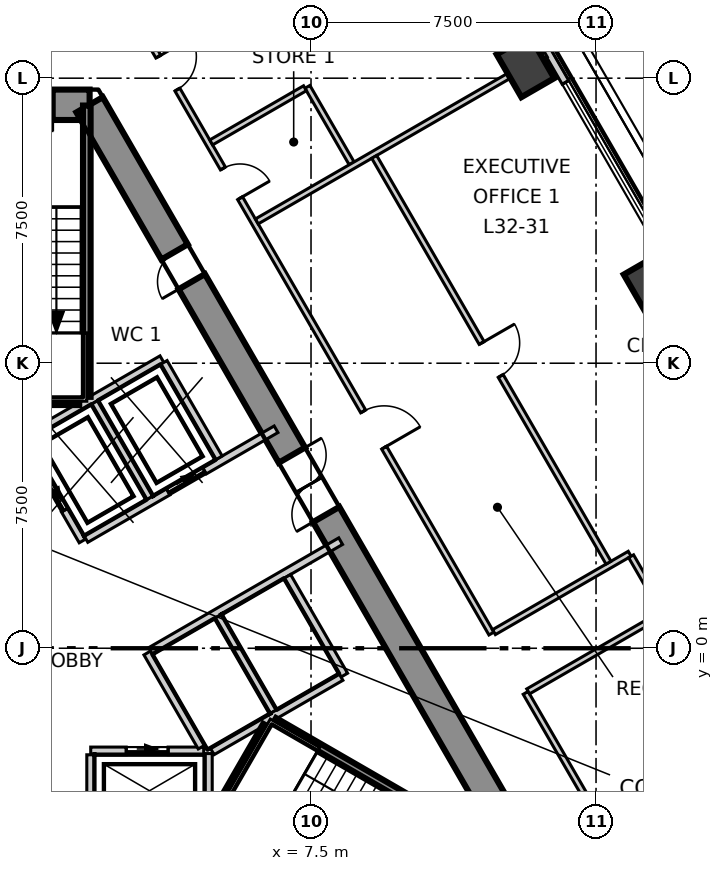
"""IFC4 building model, lengths in metres.
Left out: names, types, materials, properties, quantities, classifications, styles, units other than length and angle.
Written with IfcOpenShell. Run it as: python <this file> out.ifc"""

import sys

from ifc_helpers import new_model, si_unit, direction, frame, frame_2d, origin, origin_2d, place, context, subcontext, project, spatial, polyline, rectangle, outline, extrude, element, fill, save


model = new_model("IFC4")
c1 = context("Model", 3, precision=1e-05, world=origin(), true_north=direction((0.0, 1.0)))
c2 = subcontext(c1, "Body", "Model", "MODEL_VIEW")
j1 = project(units=[si_unit("LENGTHUNIT", "METRE"), si_unit("PLANEANGLEUNIT", "RADIAN")], contexts=[c1])
p1 = place(None, origin())
s1 = spatial("IfcSite", under=j1, at=p1, CompositionType="ELEMENT")
p2 = place(p1, origin())
s2 = spatial("IfcBuilding", under=s1, at=p2, CompositionType="ELEMENT")
p3 = place(p2, frame((0.0, 0.0, 140.3)))
s3 = spatial("IfcBuildingStorey", under=s2, at=p3, CompositionType="ELEMENT", Elevation=140.3)
p4 = place(p3, frame((1.674, 14.3, -0.3), z_axis=(0.0, 0.0, 1.0), x_axis=(-1.0, 0.0, 0.0)))
e1 = element("IfcWall", 1, at=p4, inside=s3, PredefinedType="SHEAR", context=c2, shape_type="SweptSolid", body=[
    extrude(outline(polyline([(-0.231, -0.4), (1.674, -0.4), (3.579, -0.4), (3.117, 0.4), (1.674, 0.4), (0.231, 0.4), (-0.231, -0.4)])), origin(), (0.0, 0.0, 1.0), 4.0),
])
p5 = place(p4, frame((0.974, 0.0, 0.3)))
e2 = element("IfcOpeningElement", 2, at=p5, cuts=e1, PredefinedType="OPENING", context=c2, shape_type="SweptSolid", body=[
    extrude(rectangle(XDim=1.4, YDim=2.1, at=frame_2d((0.7, 1.05))), frame((0.0, 0.41, 0.0), z_axis=(0.0, -1.0, 0.0), x_axis=(1.0, 0.0, 0.0)), (0.0, 0.0, 1.0), 0.82),
])
p6 = place(p3, frame((13.221, -5.7, -0.3), z_axis=(0.0, 0.0, 1.0), x_axis=(-0.499995765644, 0.866027848477, 0.0)))
e3 = element("IfcWall", 3, at=p6, inside=s3, PredefinedType="SHEAR", context=c2, shape_type="SweptSolid", body=[
    extrude(outline(polyline([(-0.231, -0.4), (1.732, -0.4), (3.695, -0.4), (5.658, -0.4), (7.621, -0.4), (9.584, -0.4), (11.547, -0.4), (13.51, -0.4), (15.473, -0.4), (17.436, -0.4), (19.399, -0.4), (21.362, -0.4), (23.325, -0.4), (22.863, 0.4), (20.977, 0.4), (19.091, 0.4), (17.205, 0.4), (15.319, 0.4), (13.433, 0.4), (11.547, 0.4), (9.661, 0.4), (7.775, 0.4), (5.889, 0.4), (4.003, 0.4), (2.117, 0.4), (0.231, 0.4), (-0.231, -0.4)])), origin(), (0.0, 0.0, 1.0), 4.0),
])
p7 = place(p6, frame((10.647, 0.0, 0.3)))
e4 = element("IfcOpeningElement", 4, at=p7, cuts=e3, PredefinedType="OPENING", context=c2, shape_type="SweptSolid", body=[
    extrude(rectangle(XDim=1.8, YDim=2.1, at=frame_2d((0.9, 1.05))), frame((0.0, 0.41, 0.0), z_axis=(0.0, -1.0, 0.0), x_axis=(1.0, 0.0, 0.0)), (0.0, 0.0, 1.0), 0.82),
])
p8 = place(p6, frame((17.721, 0.0, 0.3)))
e5 = element("IfcOpeningElement", 5, at=p8, cuts=e3, PredefinedType="OPENING", context=c2, shape_type="SweptSolid", body=[
    extrude(rectangle(XDim=0.9, YDim=2.1, at=frame_2d((0.45, 1.05))), frame((0.0, 0.41, 0.0), z_axis=(0.0, -1.0, 0.0), x_axis=(1.0, 0.0, 0.0)), (0.0, 0.0, 1.0), 0.82),
])
for number, where, z_axis, x_axis in (
    (6, (16.488, 9.52, -0.3), (0.0, 0.0, 1.0), (-0.5, 0.866, 0.0)),
    (7, (13.143, 15.313, -0.3), (0.0, 0.0, 1.0), (-0.5, 0.866, 0.0)),
):
    element("IfcColumn", number, at=place(p3, frame(where, z_axis=z_axis, x_axis=x_axis)), inside=s3, PredefinedType="COLUMN", context=c2, shape_type="SweptSolid", body=[
        extrude(rectangle(XDim=1.3, YDim=1.0, at=origin_2d()), origin(), (0.0, 0.0, 1.0), 4.0),
    ])
p9 = place(p3, frame((31.126, -14.433, 0.0), z_axis=(0.0, 0.0, 1.0), x_axis=(-0.500008098571, 0.866020728022, 0.0)))
e8 = element("IfcWall", 8, at=p9, inside=s3, PredefinedType="ELEMENTEDWALL", context=c2, shape_type="SweptSolid", body=[
    extrude(rectangle(XDim=56.105, YDim=0.2, at=frame_2d((28.052, 0.0))), origin(), (0.0, 0.0, 1.0), 3.7),
])
p10 = place(p9, frame((2.198, 0.0, 0.9)))
e9 = element("IfcOpeningElement", 9, at=p10, cuts=e8, PredefinedType="OPENING", context=c2, shape_type="SweptSolid", body=[
    extrude(rectangle(XDim=4.9, YDim=2.5, at=frame_2d((2.45, 1.25))), frame((0.0, 0.11, 0.0), z_axis=(0.0, -1.0, 0.0), x_axis=(1.0, 0.0, 0.0)), (0.0, 0.0, 1.0), 0.22),
])
p11 = place(p9, frame((8.888, 0.0, 0.9)))
e10 = element("IfcOpeningElement", 10, at=p11, cuts=e8, PredefinedType="OPENING", context=c2, shape_type="SweptSolid", body=[
    extrude(rectangle(XDim=4.9, YDim=2.5, at=frame_2d((2.45, 1.25))), frame((0.0, 0.11, 0.0), z_axis=(0.0, -1.0, 0.0), x_axis=(1.0, 0.0, 0.0)), (0.0, 0.0, 1.0), 0.22),
])
p12 = place(p9, frame((15.578, 0.0, 0.9)))
e11 = element("IfcOpeningElement", 11, at=p12, cuts=e8, PredefinedType="OPENING", context=c2, shape_type="SweptSolid", body=[
    extrude(rectangle(XDim=4.9, YDim=2.5, at=frame_2d((2.45, 1.25))), frame((0.0, 0.11, 0.0), z_axis=(0.0, -1.0, 0.0), x_axis=(1.0, 0.0, 0.0)), (0.0, 0.0, 1.0), 0.22),
])
p13 = place(p9, frame((22.267, 0.0, 0.9)))
e12 = element("IfcOpeningElement", 12, at=p13, cuts=e8, PredefinedType="OPENING", context=c2, shape_type="SweptSolid", body=[
    extrude(rectangle(XDim=4.9, YDim=2.5, at=frame_2d((2.45, 1.25))), frame((0.0, 0.11, 0.0), z_axis=(0.0, -1.0, 0.0), x_axis=(1.0, 0.0, 0.0)), (0.0, 0.0, 1.0), 0.22),
])
p14 = place(p9, frame((28.957, 0.0, 0.9)))
e13 = element("IfcOpeningElement", 13, at=p14, cuts=e8, PredefinedType="OPENING", context=c2, shape_type="SweptSolid", body=[
    extrude(rectangle(XDim=4.9, YDim=2.5, at=frame_2d((2.45, 1.25))), frame((0.0, 0.11, 0.0), z_axis=(0.0, -1.0, 0.0), x_axis=(1.0, 0.0, 0.0)), (0.0, 0.0, 1.0), 0.22),
])
p15 = place(p9, frame((35.647, 0.0, 0.9)))
e14 = element("IfcOpeningElement", 14, at=p15, cuts=e8, PredefinedType="OPENING", context=c2, shape_type="SweptSolid", body=[
    extrude(rectangle(XDim=4.9, YDim=2.5, at=frame_2d((2.45, 1.25))), frame((0.0, 0.11, 0.0), z_axis=(0.0, -1.0, 0.0), x_axis=(1.0, 0.0, 0.0)), (0.0, 0.0, 1.0), 0.22),
])
p16 = place(p9, frame((42.337, 0.0, 0.9)))
e15 = element("IfcOpeningElement", 15, at=p16, cuts=e8, PredefinedType="OPENING", context=c2, shape_type="SweptSolid", body=[
    extrude(rectangle(XDim=4.9, YDim=2.5, at=frame_2d((2.45, 1.25))), frame((0.0, 0.11, 0.0), z_axis=(0.0, -1.0, 0.0), x_axis=(1.0, 0.0, 0.0)), (0.0, 0.0, 1.0), 0.22),
])
p17 = place(p9, frame((49.027, 0.0, 0.9)))
e16 = element("IfcOpeningElement", 16, at=p17, cuts=e8, PredefinedType="OPENING", context=c2, shape_type="SweptSolid", body=[
    extrude(rectangle(XDim=4.9, YDim=2.5, at=frame_2d((2.45, 1.25))), frame((0.0, 0.11, 0.0), z_axis=(0.0, -1.0, 0.0), x_axis=(1.0, 0.0, 0.0)), (0.0, 0.0, 1.0), 0.22),
])
p18 = place(p3, frame((0.076, 21.468, 0.0), z_axis=(0.0, 0.0, 1.0), x_axis=(0.499999691263, -0.866025582034, 0.0)))
e17 = element("IfcWall", 17, at=p18, inside=s3, PredefinedType="PARTITIONING", context=c2, shape_type="SweptSolid", body=[
    extrude(rectangle(XDim=24.342, YDim=0.15, at=frame_2d((12.171, 0.0))), origin(), (0.0, 0.0, 1.0), 3.7),
])
p19 = place(p18, frame((17.594, 0.0, 0.0)))
e18 = element("IfcOpeningElement", 18, at=p19, cuts=e17, PredefinedType="OPENING", context=c2, shape_type="SweptSolid", body=[
    extrude(rectangle(XDim=1.1, YDim=2.1, at=frame_2d((0.55, 1.05))), frame((0.0, 0.085, 0.0), z_axis=(0.0, -1.0, 0.0), x_axis=(1.0, 0.0, 0.0)), (0.0, 0.0, 1.0), 0.17),
])
p20 = place(p18, frame((6.814, 0.0, 0.0)))
e19 = element("IfcOpeningElement", 19, at=p20, cuts=e17, PredefinedType="OPENING", context=c2, shape_type="SweptSolid", body=[
    extrude(rectangle(XDim=1.0, YDim=2.1, at=frame_2d((0.5, 1.05))), frame((0.0, 0.085, 0.0), z_axis=(0.0, -1.0, 0.0), x_axis=(1.0, 0.0, 0.0)), (0.0, 0.0, 1.0), 0.17),
])
p21 = place(p18, frame((10.214, 0.0, 0.0)))
e20 = element("IfcOpeningElement", 20, at=p21, cuts=e17, PredefinedType="OPENING", context=c2, shape_type="SweptSolid", body=[
    extrude(rectangle(XDim=0.9, YDim=2.1, at=frame_2d((0.45, 1.05))), frame((0.0, 0.085, 0.0), z_axis=(0.0, -1.0, 0.0), x_axis=(1.0, 0.0, 0.0)), (0.0, 0.0, 1.0), 0.17),
])
p22 = place(p18, frame((1.924, 0.0, 0.0)))
e21 = element("IfcOpeningElement", 21, at=p22, cuts=e17, PredefinedType="OPENING", context=c2, shape_type="SweptSolid", body=[
    extrude(rectangle(XDim=1.1, YDim=2.1, at=frame_2d((0.55, 1.05))), frame((0.0, 0.085, 0.0), z_axis=(0.0, -1.0, 0.0), x_axis=(1.0, 0.0, 0.0)), (0.0, 0.0, 1.0), 0.17),
])
p23 = place(p3, frame((13.148, -1.174, 0.0), z_axis=(0.0, 0.0, 1.0), x_axis=(0.500088017957, -0.865974580629, 0.0)))
e22 = element("IfcWall", 22, at=p23, inside=s3, PredefinedType="PARTITIONING", context=c2, shape_type="SweptSolid", body=[
    extrude(rectangle(XDim=10.964, YDim=0.15, at=frame_2d((5.482, 0.0))), origin(), (0.0, 0.0, 1.0), 3.7),
])
p24 = place(p23, frame((4.964, 0.0, 0.0)))
e23 = element("IfcOpeningElement", 23, at=p24, cuts=e22, PredefinedType="OPENING", context=c2, shape_type="SweptSolid", body=[
    extrude(rectangle(XDim=1.1, YDim=2.1, at=frame_2d((0.55, 1.05))), frame((0.0, 0.085, 0.0), z_axis=(0.0, -1.0, 0.0), x_axis=(1.0, 0.0, 0.0)), (0.0, 0.0, 1.0), 0.17),
])
p25 = place(p3, frame((7.406, 14.772, 0.0), z_axis=(0.0, 0.0, 1.0), x_axis=(0.50029509392, -0.865854964183, 0.0)))
e24 = element("IfcWall", 24, at=p25, inside=s3, PredefinedType="PARTITIONING", context=c2, shape_type="SweptSolid", body=[
    extrude(rectangle(XDim=2.325, YDim=0.15, at=frame_2d((1.162, 0.0))), origin(), (0.0, 0.0, 1.0), 3.7),
])
p26 = place(p3, frame((4.873, 13.31, 0.0), z_axis=(0.0, 0.0, 1.0), x_axis=(0.866004402611, 0.500036373335, 0.0)))
e25 = element("IfcWall", 25, at=p26, inside=s3, PredefinedType="PARTITIONING", context=c2, shape_type="SweptSolid", body=[
    extrude(rectangle(XDim=2.85, YDim=0.15, at=frame_2d((1.425, 0.0))), origin(), (0.0, 0.0, 1.0), 3.7),
])
p27 = place(p3, frame((6.073, 11.231, 0.0), z_axis=(0.0, 0.0, 1.0), x_axis=(0.866014327354, 0.50001918445, 0.0)))
e26 = element("IfcWall", 26, at=p27, inside=s3, PredefinedType="PARTITIONING", context=c2, shape_type="SweptSolid", body=[
    extrude(rectangle(XDim=8.784, YDim=0.15, at=frame_2d((4.392, 0.0))), origin(), (0.0, 0.0, 1.0), 3.7),
])
p28 = place(p3, frame((12.314, 0.424, 0.0), z_axis=(0.0, 0.0, 1.0), x_axis=(0.865997263264, 0.500048737644, 0.0)))
e27 = element("IfcWall", 27, at=p28, inside=s3, PredefinedType="PARTITIONING", context=c2, shape_type="SweptSolid", body=[
    extrude(rectangle(XDim=4.124, YDim=0.15, at=frame_2d((2.062, 0.0))), origin(), (0.0, 0.0, 1.0), 3.7),
])
p29 = place(p3, frame((15.923, 2.421, 0.0), z_axis=(0.0, 0.0, 1.0), x_axis=(0.499702028684, -0.866197369269, 0.0)))
e28 = element("IfcWall", 28, at=p29, inside=s3, PredefinedType="PARTITIONING", context=c2, shape_type="SweptSolid", body=[
    extrude(rectangle(XDim=1.725, YDim=0.15, at=frame_2d((0.862, 0.0))), origin(), (0.0, 0.0, 1.0), 3.7),
])
p30 = place(p3, frame((13.214, -1.135, 0.0), z_axis=(0.0, 0.0, 1.0), x_axis=(0.865940524948, 0.500146985649, 0.0)))
e29 = element("IfcWall", 29, at=p30, inside=s3, PredefinedType="PARTITIONING", context=c2, shape_type="SweptSolid", body=[
    extrude(rectangle(XDim=4.049, YDim=0.15, at=frame_2d((2.024, 0.0))), origin(), (0.0, 0.0, 1.0), 3.7),
])
p31 = place(p3, frame((9.163, 12.929, 0.0), z_axis=(0.0, 0.0, 1.0), x_axis=(0.499991554064, -0.866030279993, 0.0)))
e30 = element("IfcWall", 30, at=p31, inside=s3, PredefinedType="PARTITIONING", context=c2, shape_type="SweptSolid", body=[
    extrude(rectangle(XDim=12.33, YDim=0.15, at=frame_2d((6.165, 0.0))), origin(), (0.0, 0.0, 1.0), 3.7),
])
p32 = place(p31, frame((5.655, 0.0, 0.0)))
e31 = element("IfcOpeningElement", 31, at=p32, cuts=e30, PredefinedType="OPENING", context=c2, shape_type="SweptSolid", body=[
    extrude(rectangle(XDim=1.0, YDim=2.1, at=frame_2d((0.5, 1.05))), frame((0.0, 0.085, 0.0), z_axis=(0.0, -1.0, 0.0), x_axis=(1.0, 0.0, 0.0)), (0.0, 0.0, 1.0), 0.17),
])
p33 = place(p3, frame((1.703, -2.7, 0.0), z_axis=(0.0, 0.0, 1.0), x_axis=(1.0, 0.0, 0.0)))
e32 = element("IfcWall", 32, at=p33, inside=s3, PredefinedType="SOLIDWALL", context=c2, shape_type="SweptSolid", body=[
    extrude(rectangle(XDim=2.973, YDim=0.2, at=frame_2d((1.487, 0.0))), origin(), (0.0, 0.0, 1.0), 3.7),
])
p34 = place(p33, frame((0.936, 0.0, 0.0)))
e33 = element("IfcOpeningElement", 33, at=p34, cuts=e32, PredefinedType="OPENING", context=c2, shape_type="SweptSolid", body=[
    extrude(rectangle(XDim=1.1, YDim=2.1, at=frame_2d((0.55, 1.05))), frame((0.0, 0.11, 0.0), z_axis=(0.0, -1.0, 0.0), x_axis=(1.0, 0.0, 0.0)), (0.0, 0.0, 1.0), 0.22),
])
p35 = place(p3, frame((-0.002, 5.542, 0.0), z_axis=(0.0, 0.0, 1.0), x_axis=(0.866103910842, 0.499863997127, 0.0)))
e34 = element("IfcWall", 34, at=p35, inside=s3, PredefinedType="SOLIDWALL", context=c2, shape_type="SweptSolid", body=[
    extrude(rectangle(XDim=4.131, YDim=0.2, at=frame_2d((2.065, 0.0))), origin(), (0.0, 0.0, 1.0), 3.7),
])
p36 = place(p3, frame((0.0, 5.4, 0.0), z_axis=(0.0, 0.0, 1.0), x_axis=(0.500103862429, -0.865965430478, 0.0)))
e35 = element("IfcWall", 35, at=p36, inside=s3, PredefinedType="SOLIDWALL", context=c2, shape_type="SweptSolid", body=[
    extrude(rectangle(XDim=2.973, YDim=0.2, at=frame_2d((1.487, 0.0))), origin(), (0.0, 0.0, 1.0), 3.7),
])
p37 = place(p36, frame((0.937, 0.0, 0.0)))
e36 = element("IfcOpeningElement", 36, at=p37, cuts=e35, PredefinedType="OPENING", context=c2, shape_type="SweptSolid", body=[
    extrude(rectangle(XDim=1.1, YDim=2.1, at=frame_2d((0.55, 1.05))), frame((0.0, 0.11, 0.0), z_axis=(0.0, -1.0, 0.0), x_axis=(1.0, 0.0, 0.0)), (0.0, 0.0, 1.0), 0.22),
])
p38 = place(p3, frame((3.19, -0.125, 0.0), z_axis=(0.0, 0.0, 1.0), x_axis=(0.499988658015, -0.866031951983, 0.0)))
e37 = element("IfcWall", 37, at=p38, inside=s3, PredefinedType="SOLIDWALL", context=c2, shape_type="SweptSolid", body=[
    extrude(rectangle(XDim=2.858, YDim=0.2, at=frame_2d((1.429, 0.0))), origin(), (0.0, 0.0, 1.0), 3.7),
])
p39 = place(p3, frame((1.577, 2.874, 0.0), z_axis=(0.0, 0.0, 1.0), x_axis=(0.866073694534, 0.499916348638, 0.0)))
e38 = element("IfcWall", 38, at=p39, inside=s3, PredefinedType="SOLIDWALL", context=c2, shape_type="SweptSolid", body=[
    extrude(rectangle(XDim=5.777, YDim=0.2, at=frame_2d((2.888, 0.0))), origin(), (0.0, 0.0, 1.0), 3.7),
])
p40 = place(p39, frame((2.497, 0.0, 0.0)))
e39 = element("IfcOpeningElement", 39, at=p40, cuts=e38, PredefinedType="OPENING", context=c2, shape_type="SweptSolid", body=[
    extrude(rectangle(XDim=1.1, YDim=2.1, at=frame_2d((0.55, 1.05))), frame((0.0, 0.11, 0.0), z_axis=(0.0, -1.0, 0.0), x_axis=(1.0, 0.0, 0.0)), (0.0, 0.0, 1.0), 0.22),
])
p41 = place(p3, frame((1.7, -8.58, 0.0), z_axis=(0.0, 0.0, 1.0), x_axis=(0.0, 1.0, 0.0)))
e40 = element("IfcWall", 40, at=p41, inside=s3, PredefinedType="SOLIDWALL", context=c2, shape_type="SweptSolid", body=[
    extrude(rectangle(XDim=5.777, YDim=0.2, at=frame_2d((2.889, 0.0))), origin(), (0.0, 0.0, 1.0), 3.7),
])
p42 = place(p41, frame((2.18, 0.0, 0.0)))
e41 = element("IfcOpeningElement", 41, at=p42, cuts=e40, PredefinedType="OPENING", context=c2, shape_type="SweptSolid", body=[
    extrude(rectangle(XDim=1.1, YDim=2.1, at=frame_2d((0.55, 1.05))), frame((0.0, 0.11, 0.0), z_axis=(0.0, -1.0, 0.0), x_axis=(1.0, 0.0, 0.0)), (0.0, 0.0, 1.0), 0.22),
])
p43 = place(p3, frame((3.278, -0.071, 0.0), z_axis=(0.0, 0.0, 1.0), x_axis=(0.865929348003, 0.5001663366, 0.0)))
e42 = element("IfcWall", 42, at=p43, inside=s3, PredefinedType="SOLIDWALL", context=c2, shape_type="SweptSolid", body=[
    extrude(rectangle(XDim=5.776, YDim=0.2, at=frame_2d((2.888, 0.0))), origin(), (0.0, 0.0, 1.0), 3.7),
])
p44 = place(p3, frame((4.8, -6.8, 0.0), z_axis=(0.0, 0.0, 1.0), x_axis=(0.0, 1.0, 0.0)))
e43 = element("IfcWall", 43, at=p44, inside=s3, PredefinedType="SOLIDWALL", context=c2, shape_type="SweptSolid", body=[
    extrude(rectangle(XDim=4.029, YDim=0.2, at=frame_2d((2.015, 0.0))), origin(), (0.0, 0.0, 1.0), 3.7),
])
p45 = place(p3, frame((3.626, 7.52, 0.0), z_axis=(0.0, 0.0, 1.0), x_axis=(0.500060147554, -0.865990674793, 0.0)))
e44 = element("IfcWall", 44, at=p45, inside=s3, PredefinedType="SOLIDWALL", context=c2, shape_type="SweptSolid", body=[
    extrude(rectangle(XDim=2.9, YDim=0.2, at=frame_2d((1.45, 0.0))), origin(), (0.0, 0.0, 1.0), 3.7),
])
p46 = place(p3, frame((6.876, 1.891, 0.0), z_axis=(0.0, 0.0, 1.0), x_axis=(0.499990139034, -0.866031096941, 0.0)))
e45 = element("IfcWall", 45, at=p46, inside=s3, PredefinedType="SOLIDWALL", context=c2, shape_type="SweptSolid", body=[
    extrude(rectangle(XDim=3.0, YDim=0.2, at=frame_2d((1.5, 0.0))), origin(), (0.0, 0.0, 1.0), 3.7),
])
for number, where, z_axis, x_axis in (
    (46, (1.807, 6.47, 0.0), (0.0, 0.0, 1.0), (0.5, -0.866, 0.0)),
    (47, (5.057, 0.841, 0.0), (0.0, 0.0, 1.0), (0.5, -0.866, 0.0)),
):
    element("IfcWall", number, at=place(p3, frame(where, z_axis=z_axis, x_axis=x_axis)), inside=s3, PredefinedType="SOLIDWALL", context=c2, shape_type="SweptSolid", body=[
        extrude(rectangle(XDim=2.9, YDim=0.2, at=frame_2d((1.45, 0.0))), origin(), (0.0, 0.0, 1.0), 3.7),
    ])
p47 = place(p3, frame((4.9, -2.714, 0.0), z_axis=(0.0, 0.0, 1.0), x_axis=(0.865992350556, 0.500057245502, 0.0)))
e48 = element("IfcWall", 48, at=p47, inside=s3, PredefinedType="SOLIDWALL", context=c2, shape_type="SweptSolid", body=[
    extrude(rectangle(XDim=3.914, YDim=0.2, at=frame_2d((1.957, 0.0))), origin(), (0.0, 0.0, 1.0), 3.7),
])
p48 = place(p3, frame((1.6, 6.615, 0.0), z_axis=(0.0, 0.0, 1.0), x_axis=(0.0, 1.0, 0.0)))
e49 = element("IfcWall", 49, at=p48, inside=s3, PredefinedType="SOLIDWALL", context=c2, shape_type="SweptSolid", body=[
    extrude(rectangle(XDim=7.665, YDim=0.2, at=frame_2d((3.833, 0.0))), origin(), (0.0, 0.0, 1.0), 3.7),
])
p49 = place(p3, frame((-1.4, 6.5, 0.0), z_axis=(0.0, 0.0, 1.0), x_axis=(1.0, 0.0, 0.0)))
e50 = element("IfcWall", 50, at=p49, inside=s3, PredefinedType="SOLIDWALL", context=c2, shape_type="SweptSolid", body=[
    extrude(rectangle(XDim=2.8, YDim=0.2, at=frame_2d((1.4, 0.0))), origin(), (0.0, 0.0, 1.0), 3.7),
])
p50 = place(p3, frame((4.929, -4.462, 0.0), z_axis=(0.0, 0.0, 1.0), x_axis=(0.500200581029, 0.865909567298, 0.0)))
e51 = element("IfcWall", 51, at=p50, inside=s3, PredefinedType="SOLIDWALL", context=c2, shape_type="SweptSolid", body=[
    extrude(rectangle(XDim=2.799, YDim=0.2, at=frame_2d((1.399, 0.0))), origin(), (0.0, 0.0, 1.0), 3.7),
])
p51 = place(p3, frame((6.529, -1.922, 0.0), z_axis=(0.0, 0.0, 1.0), x_axis=(0.866060938598, -0.499938446846, 0.0)))
e52 = element("IfcWall", 52, at=p51, inside=s3, PredefinedType="SOLIDWALL", context=c2, shape_type="SweptSolid", body=[
    extrude(rectangle(XDim=7.665, YDim=0.2, at=frame_2d((3.832, 0.0))), origin(), (0.0, 0.0, 1.0), 3.7),
])
p52 = place(p14, origin())
e53 = element("IfcWindow", 53, at=p52, inside=s3, PartitioningType="SINGLE_PANEL", PredefinedType="WINDOW", context=c2, shape_type="SweptSolid", body=[
    extrude(rectangle(XDim=4.9, YDim=2.5, at=frame_2d((2.45, 1.25))), frame((0.0, 0.03, 0.0), z_axis=(0.0, -1.0, 0.0), x_axis=(1.0, 0.0, 0.0)), (0.0, 0.0, 1.0), 0.06),
])
fill(e13, e53)
p53 = place(p34, origin())
e54 = element("IfcDoor", 54, at=p53, inside=s3, OperationType="SLIDING_TO_LEFT", PredefinedType="DOOR", context=c2, shape_type="SweptSolid", body=[
    extrude(rectangle(XDim=1.1, YDim=2.1, at=frame_2d((0.55, 1.05))), frame((0.0, 0.025, 0.0), z_axis=(0.0, -1.0, 0.0), x_axis=(1.0, 0.0, 0.0)), (0.0, 0.0, 1.0), 0.05),
])
fill(e33, e54)
p54 = place(p37, origin())
e55 = element("IfcDoor", 55, at=p54, inside=s3, OperationType="SLIDING_TO_LEFT", PredefinedType="DOOR", context=c2, shape_type="SweptSolid", body=[
    extrude(rectangle(XDim=1.1, YDim=2.1, at=frame_2d((0.55, 1.05))), frame((0.0, 0.025, 0.0), z_axis=(0.0, -1.0, 0.0), x_axis=(1.0, 0.0, 0.0)), (0.0, 0.0, 1.0), 0.05),
])
fill(e36, e55)
p55 = place(p40, origin())
e56 = element("IfcDoor", 56, at=p55, inside=s3, OperationType="SLIDING_TO_LEFT", PredefinedType="DOOR", context=c2, shape_type="SweptSolid", body=[
    extrude(rectangle(XDim=1.1, YDim=2.1, at=frame_2d((0.55, 1.05))), frame((0.0, 0.025, 0.0), z_axis=(0.0, -1.0, 0.0), x_axis=(1.0, 0.0, 0.0)), (0.0, 0.0, 1.0), 0.05),
])
fill(e39, e56)
p56 = place(p19, origin())
e57 = element("IfcDoor", 57, at=p56, inside=s3, OperationType="SINGLE_SWING_LEFT", PredefinedType="DOOR", context=c2, shape_type="SweptSolid", body=[
    extrude(rectangle(XDim=1.1, YDim=2.1, at=frame_2d((0.55, 1.05))), frame((0.0, 0.025, 0.0), z_axis=(0.0, -1.0, 0.0), x_axis=(1.0, 0.0, 0.0)), (0.0, 0.0, 1.0), 0.05),
])
fill(e18, e57)
p57 = place(p32, origin())
e58 = element("IfcDoor", 58, at=p57, inside=s3, OperationType="SINGLE_SWING_RIGHT", PredefinedType="DOOR", context=c2, shape_type="SweptSolid", body=[
    extrude(rectangle(XDim=1.0, YDim=2.1, at=frame_2d((0.5, 1.05))), frame((0.0, 0.025, 0.0), z_axis=(0.0, -1.0, 0.0), x_axis=(1.0, 0.0, 0.0)), (0.0, 0.0, 1.0), 0.05),
])
fill(e31, e58)
p58 = place(p20, origin())
e59 = element("IfcDoor", 59, at=p58, inside=s3, OperationType="SINGLE_SWING_RIGHT", PredefinedType="DOOR", context=c2, shape_type="SweptSolid", body=[
    extrude(rectangle(XDim=1.0, YDim=2.1, at=frame_2d((0.5, 1.05))), frame((0.0, 0.025, 0.0), z_axis=(0.0, -1.0, 0.0), x_axis=(1.0, 0.0, 0.0)), (0.0, 0.0, 1.0), 0.05),
])
fill(e19, e59)
p59 = place(p21, origin())
e60 = element("IfcDoor", 60, at=p59, inside=s3, OperationType="SINGLE_SWING_LEFT", PredefinedType="DOOR", context=c2, shape_type="SweptSolid", body=[
    extrude(rectangle(XDim=0.9, YDim=2.1, at=frame_2d((0.45, 1.05))), frame((0.0, 0.025, 0.0), z_axis=(0.0, -1.0, 0.0), x_axis=(1.0, 0.0, 0.0)), (0.0, 0.0, 1.0), 0.05),
])
fill(e20, e60)
p60 = place(p7, origin())
e61 = element("IfcDoor", 61, at=p60, inside=s3, OperationType="DOUBLE_DOOR_SINGLE_SWING", PredefinedType="DOOR", context=c2, shape_type="SweptSolid", body=[
    extrude(rectangle(XDim=1.8, YDim=2.1, at=frame_2d((0.9, 1.05))), frame((0.0, 0.025, 0.0), z_axis=(0.0, -1.0, 0.0), x_axis=(1.0, 0.0, 0.0)), (0.0, 0.0, 1.0), 0.05),
])
fill(e4, e61)
p61 = place(p8, origin())
e62 = element("IfcDoor", 62, at=p61, inside=s3, OperationType="SINGLE_SWING_RIGHT", PredefinedType="DOOR", context=c2, shape_type="SweptSolid", body=[
    extrude(rectangle(XDim=0.9, YDim=2.1, at=frame_2d((0.45, 1.05))), frame((0.0, 0.025, 0.0), z_axis=(0.0, -1.0, 0.0), x_axis=(1.0, 0.0, 0.0)), (0.0, 0.0, 1.0), 0.05),
])
fill(e5, e62)
save(model, sys.argv[1])
